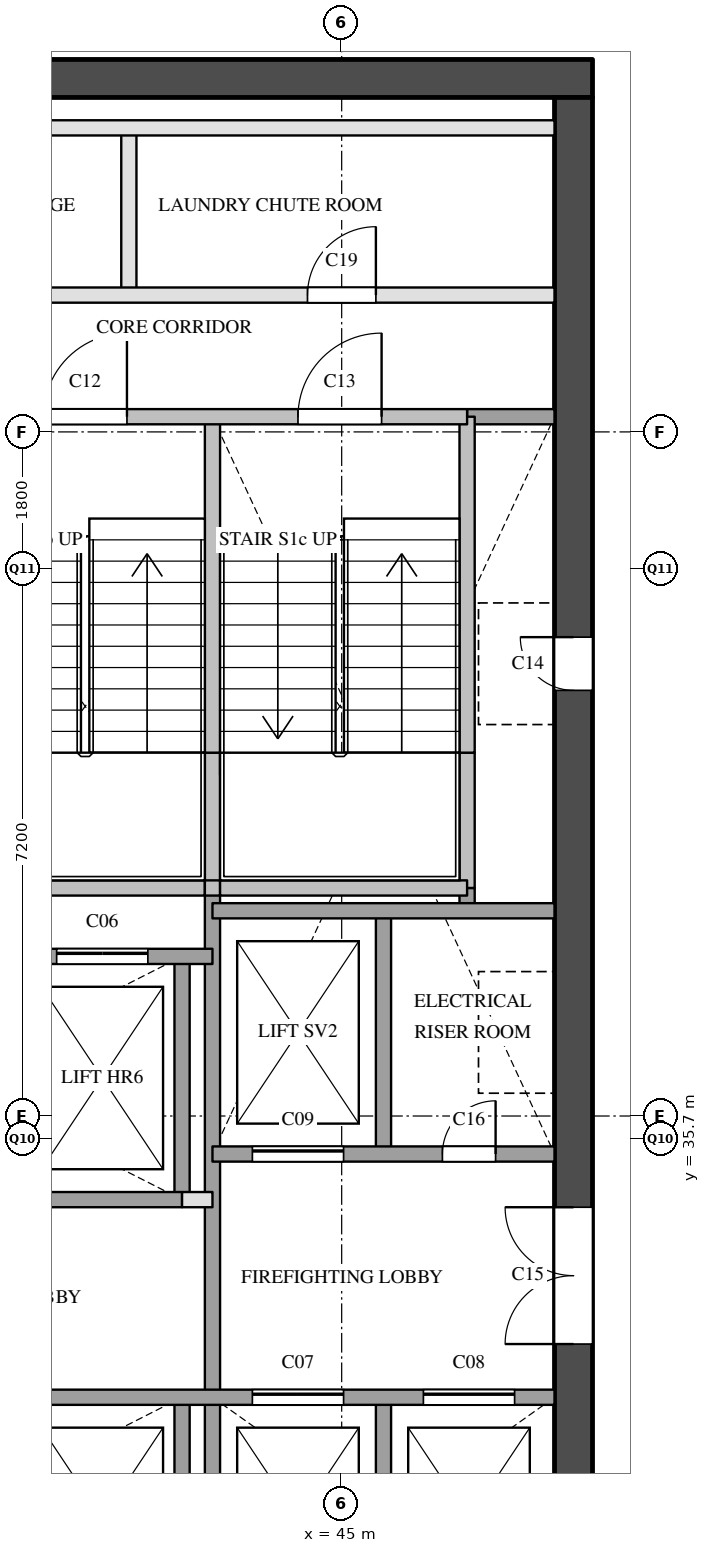
"""IFC4 building model, lengths in metres.
Left out: names, types, materials, properties, quantities, classifications, styles, units other than length and angle.
Written with IfcOpenShell. Run it as: python <this file> out.ifc"""

import sys

from ifc_helpers import new_model, si_unit, direction, frame, frame_2d, origin, place, context, subcontext, project, spatial, rectangle, extrude, element, fill, save


model = new_model("IFC4")
c1 = context("Model", 3, precision=1e-05, world=origin(), true_north=direction((0.0, 1.0)))
c2 = subcontext(c1, "Body", "Model", "MODEL_VIEW")
j1 = project(units=[si_unit("LENGTHUNIT", "METRE"), si_unit("PLANEANGLEUNIT", "RADIAN")], contexts=[c1])
p1 = place(None, origin())
s1 = spatial("IfcSite", under=j1, at=p1, CompositionType="ELEMENT")
p2 = place(p1, origin())
s2 = spatial("IfcBuilding", under=s1, at=p2, CompositionType="ELEMENT")
p3 = place(p2, frame((0.0, 0.0, 189.5)))
s3 = spatial("IfcBuildingStorey", under=s2, at=p3, CompositionType="ELEMENT", Elevation=189.5)
p4 = place(p3, frame((36.1, 49.65, 0.0), z_axis=(0.0, 0.0, 1.0), x_axis=(1.0, 0.0, 0.0)))
e1 = element("IfcWall", 1, at=p4, inside=s3, PredefinedType="SHEAR", context=c2, shape_type="SweptSolid", body=[
    extrude(rectangle(XDim=12.2, YDim=0.5, at=frame_2d((6.1, 0.0))), origin(), (0.0, 0.0, 1.0), 3.6),
])
p5 = place(p3, frame((48.05, 29.1, 0.0), z_axis=(0.0, 0.0, 1.0), x_axis=(0.0, 1.0, 0.0)))
e2 = element("IfcWall", 2, at=p5, inside=s3, PredefinedType="SHEAR", context=c2, shape_type="SweptSolid", body=[
    extrude(rectangle(XDim=20.3, YDim=0.5, at=frame_2d((10.15, 0.0))), origin(), (0.0, 0.0, 1.0), 3.6),
])
p6 = place(p5, frame((12.5, 0.0, 0.0)))
e3 = element("IfcOpeningElement", 3, at=p6, cuts=e2, PredefinedType="OPENING", context=c2, shape_type="SweptSolid", body=[
    extrude(rectangle(XDim=0.7, YDim=2.1, at=frame_2d((0.35, 1.05))), frame((0.0, 0.26, 0.0), z_axis=(0.0, -1.0, 0.0), x_axis=(1.0, 0.0, 0.0)), (0.0, 0.0, 1.0), 0.52),
])
p7 = place(p5, frame((3.9, 0.0, 0.0)))
e4 = element("IfcOpeningElement", 4, at=p7, cuts=e2, PredefinedType="OPENING", context=c2, shape_type="SweptSolid", body=[
    extrude(rectangle(XDim=1.8, YDim=2.1, at=frame_2d((0.9, 1.05))), frame((0.0, 0.26, 0.0), z_axis=(0.0, -1.0, 0.0), x_axis=(1.0, 0.0, 0.0)), (0.0, 0.0, 1.0), 0.52),
])
p8 = place(p3, frame((42.2, 46.8, 0.0), z_axis=(0.0, 0.0, 1.0), x_axis=(0.0, 1.0, 0.0)))
e5 = element("IfcWall", 5, at=p8, inside=s3, PredefinedType="PARTITIONING", context=c2, shape_type="SweptSolid", body=[
    extrude(rectangle(XDim=2.2, YDim=0.2, at=frame_2d((1.1, 0.0))), origin(), (0.0, 0.0, 1.0), 3.6),
])
p9 = place(p3, frame((42.9, 29.1, 0.0), z_axis=(0.0, 0.0, 1.0), x_axis=(0.0, 1.0, 0.0)))
e6 = element("IfcWall", 6, at=p9, inside=s3, PredefinedType="SOLIDWALL", context=c2, shape_type="SweptSolid", body=[
    extrude(rectangle(XDim=3.2, YDim=0.2, at=frame_2d((1.6, 0.0))), origin(), (0.0, 0.0, 1.0), 3.6),
])
p10 = place(p3, frame((42.9, 34.9, 0.0), z_axis=(0.0, 0.0, 1.0), x_axis=(0.0, 1.0, 0.0)))
e7 = element("IfcWall", 7, at=p10, inside=s3, PredefinedType="SOLIDWALL", context=c2, shape_type="SweptSolid", body=[
    extrude(rectangle(XDim=3.2, YDim=0.2, at=frame_2d((1.6, 0.0))), origin(), (0.0, 0.0, 1.0), 3.6),
])
p11 = place(p3, frame((43.3, 29.1, 0.0), z_axis=(0.0, 0.0, 1.0), x_axis=(0.0, 1.0, 0.0)))
e8 = element("IfcWall", 8, at=p11, inside=s3, PredefinedType="SOLIDWALL", context=c2, shape_type="SweptSolid", body=[
    extrude(rectangle(XDim=9.9, YDim=0.2, at=frame_2d((4.95, 0.0))), origin(), (0.0, 0.0, 1.0), 3.6),
])
p12 = place(p3, frame((43.3, 39.0, 0.0), z_axis=(0.0, 0.0, 1.0), x_axis=(0.0, 1.0, 0.0)))
e9 = element("IfcWall", 9, at=p12, inside=s3, PredefinedType="SOLIDWALL", context=c2, shape_type="SweptSolid", body=[
    extrude(rectangle(XDim=1.78, YDim=0.2, at=frame_2d((0.89, 0.0))), origin(), (0.0, 0.0, 1.0), 3.6),
])
p13 = place(p3, frame((43.3, 40.78, 0.0), z_axis=(0.0, 0.0, 1.0), x_axis=(0.0, 1.0, 0.0)))
e10 = element("IfcWall", 10, at=p13, inside=s3, PredefinedType="SOLIDWALL", context=c2, shape_type="SweptSolid", body=[
    extrude(rectangle(XDim=4.42, YDim=0.2, at=frame_2d((2.21, 0.0))), origin(), (0.0, 0.0, 1.0), 3.6),
])
for number, where, z_axis, x_axis in (
    (11, (45.55, 29.1, 0.0), (0.0, 0.0, 1.0), (0.0, 1.0, 0.0)),
    (12, (45.55, 35.5, 0.0), (0.0, 0.0, 1.0), (0.0, 1.0, 0.0)),
):
    element("IfcWall", number, at=place(p3, frame(where, z_axis=z_axis, x_axis=x_axis)), inside=s3, PredefinedType="SOLIDWALL", context=c2, shape_type="SweptSolid", body=[
        extrude(rectangle(XDim=3.2, YDim=0.2, at=frame_2d((1.6, 0.0))), origin(), (0.0, 0.0, 1.0), 3.6),
    ])
p14 = place(p3, frame((46.65, 38.7, 0.0), z_axis=(0.0, 0.0, 1.0), x_axis=(0.0, 1.0, 0.0)))
e13 = element("IfcWall", 13, at=p14, inside=s3, PredefinedType="SOLIDWALL", context=c2, shape_type="SweptSolid", body=[
    extrude(rectangle(XDim=0.3, YDim=0.2, at=frame_2d((0.15, 0.0))), origin(), (0.0, 0.0, 1.0), 3.6),
])
p15 = place(p3, frame((46.65, 39.0, 0.0), z_axis=(0.0, 0.0, 1.0), x_axis=(0.0, 1.0, 0.0)))
e14 = element("IfcWall", 14, at=p15, inside=s3, PredefinedType="SOLIDWALL", context=c2, shape_type="SweptSolid", body=[
    extrude(rectangle(XDim=1.78, YDim=0.2, at=frame_2d((0.89, 0.0))), origin(), (0.0, 0.0, 1.0), 3.6),
])
p16 = place(p3, frame((46.65, 40.78, 0.0), z_axis=(0.0, 0.0, 1.0), x_axis=(0.0, 1.0, 0.0)))
e15 = element("IfcWall", 15, at=p16, inside=s3, PredefinedType="SOLIDWALL", context=c2, shape_type="SweptSolid", body=[
    extrude(rectangle(XDim=4.42, YDim=0.2, at=frame_2d((2.21, 0.0))), origin(), (0.0, 0.0, 1.0), 3.6),
])
p17 = place(p3, frame((36.6, 32.3, 0.0), z_axis=(0.0, 0.0, 1.0), x_axis=(1.0, 0.0, 0.0)))
e16 = element("IfcWall", 16, at=p17, inside=s3, PredefinedType="SOLIDWALL", context=c2, shape_type="SweptSolid", body=[
    extrude(rectangle(XDim=11.2, YDim=0.2, at=frame_2d((5.6, 0.0))), origin(), (0.0, 0.0, 1.0), 3.6),
])
p18 = place(p17, frame((7.225, 0.0, 0.0)))
e17 = element("IfcOpeningElement", 17, at=p18, cuts=e16, PredefinedType="OPENING", context=c2, shape_type="SweptSolid", body=[
    extrude(rectangle(XDim=1.2, YDim=2.1, at=frame_2d((0.6, 1.05))), frame((0.0, 0.11, 0.0), z_axis=(0.0, -1.0, 0.0), x_axis=(1.0, 0.0, 0.0)), (0.0, 0.0, 1.0), 0.22),
])
p19 = place(p17, frame((9.475, 0.0, 0.0)))
e18 = element("IfcOpeningElement", 18, at=p19, cuts=e16, PredefinedType="OPENING", context=c2, shape_type="SweptSolid", body=[
    extrude(rectangle(XDim=1.2, YDim=2.1, at=frame_2d((0.6, 1.05))), frame((0.0, 0.11, 0.0), z_axis=(0.0, -1.0, 0.0), x_axis=(1.0, 0.0, 0.0)), (0.0, 0.0, 1.0), 0.22),
])
p20 = place(p3, frame((42.9, 34.9, 0.0), z_axis=(0.0, 0.0, 1.0), x_axis=(1.0, 0.0, 0.0)))
e19 = element("IfcWall", 19, at=p20, inside=s3, PredefinedType="PARTITIONING", context=c2, shape_type="SweptSolid", body=[
    extrude(rectangle(XDim=0.4, YDim=0.2, at=frame_2d((0.2, 0.0))), origin(), (0.0, 0.0, 1.0), 3.6),
])
p21 = place(p3, frame((36.6, 34.9, 0.0), z_axis=(0.0, 0.0, 1.0), x_axis=(1.0, 0.0, 0.0)))
e20 = element("IfcWall", 20, at=p21, inside=s3, PredefinedType="SOLIDWALL", context=c2, shape_type="SweptSolid", body=[
    extrude(rectangle(XDim=6.3, YDim=0.2, at=frame_2d((3.15, 0.0))), origin(), (0.0, 0.0, 1.0), 3.6),
])
p22 = place(p3, frame((43.3, 35.5, 0.0), z_axis=(0.0, 0.0, 1.0), x_axis=(1.0, 0.0, 0.0)))
e21 = element("IfcWall", 21, at=p22, inside=s3, PredefinedType="SOLIDWALL", context=c2, shape_type="SweptSolid", body=[
    extrude(rectangle(XDim=4.5, YDim=0.2, at=frame_2d((2.25, 0.0))), origin(), (0.0, 0.0, 1.0), 3.6),
])
p23 = place(p22, frame((0.525, 0.0, 0.0)))
e22 = element("IfcOpeningElement", 22, at=p23, cuts=e21, PredefinedType="OPENING", context=c2, shape_type="SweptSolid", body=[
    extrude(rectangle(XDim=1.2, YDim=2.1, at=frame_2d((0.6, 1.05))), frame((0.0, 0.11, 0.0), z_axis=(0.0, -1.0, 0.0), x_axis=(1.0, 0.0, 0.0)), (0.0, 0.0, 1.0), 0.22),
])
p24 = place(p22, frame((3.025, 0.0, 0.0)))
e23 = element("IfcOpeningElement", 23, at=p24, cuts=e21, PredefinedType="OPENING", context=c2, shape_type="SweptSolid", body=[
    extrude(rectangle(XDim=0.7, YDim=2.1, at=frame_2d((0.35, 1.05))), frame((0.0, 0.11, 0.0), z_axis=(0.0, -1.0, 0.0), x_axis=(1.0, 0.0, 0.0)), (0.0, 0.0, 1.0), 0.22),
])
p25 = place(p3, frame((36.6, 38.1, 0.0), z_axis=(0.0, 0.0, 1.0), x_axis=(1.0, 0.0, 0.0)))
e24 = element("IfcWall", 24, at=p25, inside=s3, PredefinedType="SOLIDWALL", context=c2, shape_type="SweptSolid", body=[
    extrude(rectangle(XDim=6.7, YDim=0.2, at=frame_2d((3.35, 0.0))), origin(), (0.0, 0.0, 1.0), 3.6),
])
p26 = place(p25, frame((0.45, 0.0, 0.0)))
e25 = element("IfcOpeningElement", 25, at=p26, cuts=e24, PredefinedType="OPENING", context=c2, shape_type="SweptSolid", body=[
    extrude(rectangle(XDim=1.2, YDim=2.1, at=frame_2d((0.6, 1.05))), frame((0.0, 0.11, 0.0), z_axis=(0.0, -1.0, 0.0), x_axis=(1.0, 0.0, 0.0)), (0.0, 0.0, 1.0), 0.22),
])
p27 = place(p25, frame((2.55, 0.0, 0.0)))
e26 = element("IfcOpeningElement", 26, at=p27, cuts=e24, PredefinedType="OPENING", context=c2, shape_type="SweptSolid", body=[
    extrude(rectangle(XDim=1.2, YDim=2.1, at=frame_2d((0.6, 1.05))), frame((0.0, 0.11, 0.0), z_axis=(0.0, -1.0, 0.0), x_axis=(1.0, 0.0, 0.0)), (0.0, 0.0, 1.0), 0.22),
])
p28 = place(p25, frame((4.65, 0.0, 0.0)))
e27 = element("IfcOpeningElement", 27, at=p28, cuts=e24, PredefinedType="OPENING", context=c2, shape_type="SweptSolid", body=[
    extrude(rectangle(XDim=1.2, YDim=2.1, at=frame_2d((0.6, 1.05))), frame((0.0, 0.11, 0.0), z_axis=(0.0, -1.0, 0.0), x_axis=(1.0, 0.0, 0.0)), (0.0, 0.0, 1.0), 0.22),
])
p29 = place(p3, frame((43.3, 38.7, 0.0), z_axis=(0.0, 0.0, 1.0), x_axis=(1.0, 0.0, 0.0)))
e28 = element("IfcWall", 28, at=p29, inside=s3, PredefinedType="SOLIDWALL", context=c2, shape_type="SweptSolid", body=[
    extrude(rectangle(XDim=4.5, YDim=0.2, at=frame_2d((2.25, 0.0))), origin(), (0.0, 0.0, 1.0), 3.6),
])
p30 = place(p3, frame((40.05, 39.0, 0.0), z_axis=(0.0, 0.0, 1.0), x_axis=(1.0, 0.0, 0.0)))
e29 = element("IfcWall", 29, at=p30, inside=s3, PredefinedType="SOLIDWALL", context=c2, shape_type="SweptSolid", body=[
    extrude(rectangle(XDim=3.15, YDim=0.2, at=frame_2d((1.575, 0.0))), origin(), (0.0, 0.0, 1.0), 3.6),
])
p31 = place(p3, frame((43.2, 39.0, 0.0), z_axis=(0.0, 0.0, 1.0), x_axis=(1.0, 0.0, 0.0)))
e30 = element("IfcWall", 30, at=p31, inside=s3, PredefinedType="SOLIDWALL", context=c2, shape_type="SweptSolid", body=[
    extrude(rectangle(XDim=0.2, YDim=0.2, at=frame_2d((0.1, 0.0))), origin(), (0.0, 0.0, 1.0), 3.6),
])
p32 = place(p3, frame((43.4, 39.0, 0.0), z_axis=(0.0, 0.0, 1.0), x_axis=(1.0, 0.0, 0.0)))
e31 = element("IfcWall", 31, at=p32, inside=s3, PredefinedType="SOLIDWALL", context=c2, shape_type="SweptSolid", body=[
    extrude(rectangle(XDim=3.25, YDim=0.2, at=frame_2d((1.625, 0.0))), origin(), (0.0, 0.0, 1.0), 3.6),
])
p33 = place(p3, frame((46.65, 45.2, 0.0), z_axis=(0.0, 0.0, 1.0), x_axis=(1.0, 0.0, 0.0)))
e32 = element("IfcWall", 32, at=p33, inside=s3, PredefinedType="SOLIDWALL", context=c2, shape_type="SweptSolid", body=[
    extrude(rectangle(XDim=1.15, YDim=0.2, at=frame_2d((0.575, 0.0))), origin(), (0.0, 0.0, 1.0), 3.6),
])
p34 = place(p3, frame((36.6, 45.2, 0.0), z_axis=(0.0, 0.0, 1.0), x_axis=(1.0, 0.0, 0.0)))
e33 = element("IfcWall", 33, at=p34, inside=s3, PredefinedType="SOLIDWALL", context=c2, shape_type="SweptSolid", body=[
    extrude(rectangle(XDim=10.05, YDim=0.2, at=frame_2d((5.025, 0.0))), origin(), (0.0, 0.0, 1.0), 3.6),
])
p35 = place(p34, frame((1.125, 0.0, 0.0)))
e34 = element("IfcOpeningElement", 34, at=p35, cuts=e33, PredefinedType="OPENING", context=c2, shape_type="SweptSolid", body=[
    extrude(rectangle(XDim=1.1, YDim=2.1, at=frame_2d((0.55, 1.05))), frame((0.0, 0.11, 0.0), z_axis=(0.0, -1.0, 0.0), x_axis=(1.0, 0.0, 0.0)), (0.0, 0.0, 1.0), 0.22),
])
p36 = place(p34, frame((4.475, 0.0, 0.0)))
e35 = element("IfcOpeningElement", 35, at=p36, cuts=e33, PredefinedType="OPENING", context=c2, shape_type="SweptSolid", body=[
    extrude(rectangle(XDim=1.1, YDim=2.1, at=frame_2d((0.55, 1.05))), frame((0.0, 0.11, 0.0), z_axis=(0.0, -1.0, 0.0), x_axis=(1.0, 0.0, 0.0)), (0.0, 0.0, 1.0), 0.22),
])
p37 = place(p34, frame((7.825, 0.0, 0.0)))
e36 = element("IfcOpeningElement", 36, at=p37, cuts=e33, PredefinedType="OPENING", context=c2, shape_type="SweptSolid", body=[
    extrude(rectangle(XDim=1.1, YDim=2.1, at=frame_2d((0.55, 1.05))), frame((0.0, 0.11, 0.0), z_axis=(0.0, -1.0, 0.0), x_axis=(1.0, 0.0, 0.0)), (0.0, 0.0, 1.0), 0.22),
])
p38 = place(p3, frame((36.6, 46.8, 0.0), z_axis=(0.0, 0.0, 1.0), x_axis=(1.0, 0.0, 0.0)))
e37 = element("IfcWall", 37, at=p38, inside=s3, PredefinedType="PARTITIONING", context=c2, shape_type="SweptSolid", body=[
    extrude(rectangle(XDim=11.2, YDim=0.2, at=frame_2d((5.6, 0.0))), origin(), (0.0, 0.0, 1.0), 3.6),
])
p39 = place(p38, frame((2.35, 0.0, 0.0)))
e38 = element("IfcOpeningElement", 38, at=p39, cuts=e37, PredefinedType="OPENING", context=c2, shape_type="SweptSolid", body=[
    extrude(rectangle(XDim=0.9, YDim=2.1, at=frame_2d((0.45, 1.05))), frame((0.0, 0.11, 0.0), z_axis=(0.0, -1.0, 0.0), x_axis=(1.0, 0.0, 0.0)), (0.0, 0.0, 1.0), 0.22),
])
p40 = place(p38, frame((7.95, 0.0, 0.0)))
e39 = element("IfcOpeningElement", 39, at=p40, cuts=e37, PredefinedType="OPENING", context=c2, shape_type="SweptSolid", body=[
    extrude(rectangle(XDim=0.9, YDim=2.1, at=frame_2d((0.45, 1.05))), frame((0.0, 0.11, 0.0), z_axis=(0.0, -1.0, 0.0), x_axis=(1.0, 0.0, 0.0)), (0.0, 0.0, 1.0), 0.22),
])
p41 = place(p3, frame((36.6, 49.0, 0.0), z_axis=(0.0, 0.0, 1.0), x_axis=(1.0, 0.0, 0.0)))
e40 = element("IfcWall", 40, at=p41, inside=s3, PredefinedType="PARTITIONING", context=c2, shape_type="SweptSolid", body=[
    extrude(rectangle(XDim=11.2, YDim=0.2, at=frame_2d((5.6, 0.0))), origin(), (0.0, 0.0, 1.0), 3.6),
])
p42 = place(p28, origin())
e41 = element("IfcDoor", 41, at=p42, inside=s3, OperationType="SLIDING_TO_LEFT", PredefinedType="DOOR", context=c2, shape_type="SweptSolid", body=[
    extrude(rectangle(XDim=1.2, YDim=2.1, at=frame_2d((0.6, 1.05))), frame((0.0, 0.025, 0.0), z_axis=(0.0, -1.0, 0.0), x_axis=(1.0, 0.0, 0.0)), (0.0, 0.0, 1.0), 0.05),
])
fill(e27, e41)
p43 = place(p18, origin())
e42 = element("IfcDoor", 42, at=p43, inside=s3, OperationType="SLIDING_TO_LEFT", PredefinedType="DOOR", context=c2, shape_type="SweptSolid", body=[
    extrude(rectangle(XDim=1.2, YDim=2.1, at=frame_2d((0.6, 1.05))), frame((0.0, 0.025, 0.0), z_axis=(0.0, -1.0, 0.0), x_axis=(1.0, 0.0, 0.0)), (0.0, 0.0, 1.0), 0.05),
])
fill(e17, e42)
p44 = place(p19, origin())
e43 = element("IfcDoor", 43, at=p44, inside=s3, OperationType="SLIDING_TO_LEFT", PredefinedType="DOOR", context=c2, shape_type="SweptSolid", body=[
    extrude(rectangle(XDim=1.2, YDim=2.1, at=frame_2d((0.6, 1.05))), frame((0.0, 0.025, 0.0), z_axis=(0.0, -1.0, 0.0), x_axis=(1.0, 0.0, 0.0)), (0.0, 0.0, 1.0), 0.05),
])
fill(e18, e43)
p45 = place(p23, origin())
e44 = element("IfcDoor", 44, at=p45, inside=s3, OperationType="SLIDING_TO_LEFT", PredefinedType="DOOR", context=c2, shape_type="SweptSolid", body=[
    extrude(rectangle(XDim=1.2, YDim=2.1, at=frame_2d((0.6, 1.05))), frame((0.0, 0.025, 0.0), z_axis=(0.0, -1.0, 0.0), x_axis=(1.0, 0.0, 0.0)), (0.0, 0.0, 1.0), 0.05),
])
fill(e22, e44)
p46 = place(p36, origin())
e45 = element("IfcDoor", 45, at=p46, inside=s3, OperationType="SINGLE_SWING_RIGHT", PredefinedType="DOOR", context=c2, shape_type="SweptSolid", body=[
    extrude(rectangle(XDim=1.1, YDim=2.1, at=frame_2d((0.55, 1.05))), frame((0.0, 0.025, 0.0), z_axis=(0.0, -1.0, 0.0), x_axis=(1.0, 0.0, 0.0)), (0.0, 0.0, 1.0), 0.05),
])
fill(e35, e45)
p47 = place(p37, origin())
e46 = element("IfcDoor", 46, at=p47, inside=s3, OperationType="SINGLE_SWING_RIGHT", PredefinedType="DOOR", context=c2, shape_type="SweptSolid", body=[
    extrude(rectangle(XDim=1.1, YDim=2.1, at=frame_2d((0.55, 1.05))), frame((0.0, 0.025, 0.0), z_axis=(0.0, -1.0, 0.0), x_axis=(1.0, 0.0, 0.0)), (0.0, 0.0, 1.0), 0.05),
])
fill(e36, e46)
p48 = place(p6, origin())
e47 = element("IfcDoor", 47, at=p48, inside=s3, OperationType="SINGLE_SWING_RIGHT", PredefinedType="DOOR", context=c2, shape_type="SweptSolid", body=[
    extrude(rectangle(XDim=0.7, YDim=2.1, at=frame_2d((0.35, 1.05))), frame((0.0, 0.025, 0.0), z_axis=(0.0, -1.0, 0.0), x_axis=(1.0, 0.0, 0.0)), (0.0, 0.0, 1.0), 0.05),
])
fill(e3, e47)
p49 = place(p7, origin())
e48 = element("IfcDoor", 48, at=p49, inside=s3, OperationType="DOUBLE_DOOR_SINGLE_SWING", PredefinedType="DOOR", context=c2, shape_type="SweptSolid", body=[
    extrude(rectangle(XDim=1.8, YDim=2.1, at=frame_2d((0.9, 1.05))), frame((0.0, 0.025, 0.0), z_axis=(0.0, -1.0, 0.0), x_axis=(1.0, 0.0, 0.0)), (0.0, 0.0, 1.0), 0.05),
])
fill(e4, e48)
p50 = place(p24, origin())
e49 = element("IfcDoor", 49, at=p50, inside=s3, OperationType="SINGLE_SWING_RIGHT", PredefinedType="DOOR", context=c2, shape_type="SweptSolid", body=[
    extrude(rectangle(XDim=0.7, YDim=2.1, at=frame_2d((0.35, 1.05))), frame((0.0, 0.025, 0.0), z_axis=(0.0, -1.0, 0.0), x_axis=(1.0, 0.0, 0.0)), (0.0, 0.0, 1.0), 0.05),
])
fill(e23, e49)
p51 = place(p40, origin())
e50 = element("IfcDoor", 50, at=p51, inside=s3, OperationType="SINGLE_SWING_RIGHT", PredefinedType="DOOR", context=c2, shape_type="SweptSolid", body=[
    extrude(rectangle(XDim=0.9, YDim=2.1, at=frame_2d((0.45, 1.05))), frame((0.0, 0.025, 0.0), z_axis=(0.0, -1.0, 0.0), x_axis=(1.0, 0.0, 0.0)), (0.0, 0.0, 1.0), 0.05),
])
fill(e39, e50)
save(model, sys.argv[1])
